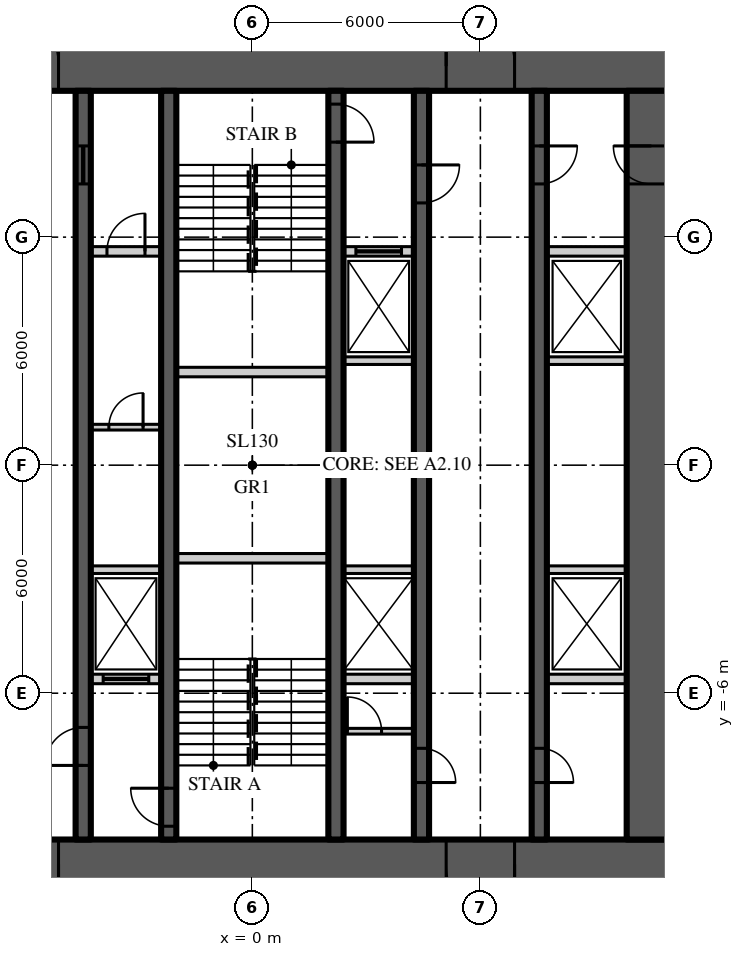
"""IFC4 building model, lengths in metres.
Left out: names, types, materials, properties, quantities, classifications, styles, units other than length and angle.
Written with IfcOpenShell. Run it as: python <this file> out.ifc"""

import sys

from ifc_helpers import new_model, si_unit, direction, frame, frame_2d, origin, place, context, subcontext, project, spatial, rectangle, extrude, element, fill, save


model = new_model("IFC4")
c1 = context("Model", 3, precision=1e-05, world=origin(), true_north=direction((0.0, 1.0)))
c2 = subcontext(c1, "Body", "Model", "MODEL_VIEW")
j1 = project(units=[si_unit("LENGTHUNIT", "METRE"), si_unit("PLANEANGLEUNIT", "RADIAN")], contexts=[c1])
p1 = place(None, origin())
s1 = spatial("IfcSite", under=j1, at=p1, CompositionType="ELEMENT")
p2 = place(p1, origin())
s2 = spatial("IfcBuilding", under=s1, at=p2, CompositionType="ELEMENT")
p3 = place(p2, frame((0.0, 0.0, 43.5)))
s3 = spatial("IfcBuildingStorey", under=s2, at=p3, CompositionType="ELEMENT", Elevation=43.5)
p4 = place(p3, frame((-11.15, 10.5, 0.0), z_axis=(0.0, 0.0, 1.0), x_axis=(1.0, 0.0, 0.0)))
e1 = element("IfcWall", 1, at=p4, inside=s3, PredefinedType="SHEAR", context=c2, shape_type="SweptSolid", body=[
    extrude(rectangle(XDim=22.3, YDim=1.3, at=frame_2d((11.15, 0.0))), origin(), (0.0, 0.0, 1.0), 3.9),
])
p5 = place(p4, frame((4.25, 0.0, 0.0)))
e2 = element("IfcOpeningElement", 2, at=p5, cuts=e1, PredefinedType="OPENING", context=c2, shape_type="SweptSolid", body=[
    extrude(rectangle(XDim=1.8, YDim=2.2, at=frame_2d((0.9, 1.1))), frame((0.0, 0.66, 0.0), z_axis=(0.0, -1.0, 0.0), x_axis=(1.0, 0.0, 0.0)), (0.0, 0.0, 1.0), 1.32),
])
p6 = place(p4, frame((16.25, 0.0, 0.0)))
e3 = element("IfcOpeningElement", 3, at=p6, cuts=e1, PredefinedType="OPENING", context=c2, shape_type="SweptSolid", body=[
    extrude(rectangle(XDim=1.8, YDim=2.2, at=frame_2d((0.9, 1.1))), frame((0.0, 0.66, 0.0), z_axis=(0.0, -1.0, 0.0), x_axis=(1.0, 0.0, 0.0)), (0.0, 0.0, 1.0), 1.32),
])
p7 = place(p3, frame((11.15, -10.5, 0.0), z_axis=(0.0, 0.0, 1.0), x_axis=(-1.0, 0.0, 0.0)))
e4 = element("IfcWall", 4, at=p7, inside=s3, PredefinedType="SHEAR", context=c2, shape_type="SweptSolid", body=[
    extrude(rectangle(XDim=22.3, YDim=1.3, at=frame_2d((11.15, 0.0))), origin(), (0.0, 0.0, 1.0), 3.9),
])
p8 = place(p7, frame((16.25, 0.0, 0.0)))
e5 = element("IfcOpeningElement", 5, at=p8, cuts=e4, PredefinedType="OPENING", context=c2, shape_type="SweptSolid", body=[
    extrude(rectangle(XDim=1.8, YDim=2.2, at=frame_2d((0.9, 1.1))), frame((0.0, 0.66, 0.0), z_axis=(0.0, -1.0, 0.0), x_axis=(1.0, 0.0, 0.0)), (0.0, 0.0, 1.0), 1.32),
])
p9 = place(p7, frame((4.25, 0.0, 0.0)))
e6 = element("IfcOpeningElement", 6, at=p9, cuts=e4, PredefinedType="OPENING", context=c2, shape_type="SweptSolid", body=[
    extrude(rectangle(XDim=1.8, YDim=2.2, at=frame_2d((0.9, 1.1))), frame((0.0, 0.66, 0.0), z_axis=(0.0, -1.0, 0.0), x_axis=(1.0, 0.0, 0.0)), (0.0, 0.0, 1.0), 1.32),
])
p10 = place(p3, frame((10.5, -9.85, 0.0), z_axis=(0.0, 0.0, 1.0), x_axis=(0.0, 1.0, 0.0)))
e7 = element("IfcWall", 7, at=p10, inside=s3, PredefinedType="SHEAR", context=c2, shape_type="SweptSolid", body=[
    extrude(rectangle(XDim=19.7, YDim=1.3, at=frame_2d((9.85, 0.0))), origin(), (0.0, 0.0, 1.0), 3.9),
])
p11 = place(p10, frame((17.25, 0.0, 0.0)))
e8 = element("IfcOpeningElement", 8, at=p11, cuts=e7, PredefinedType="OPENING", context=c2, shape_type="SweptSolid", body=[
    extrude(rectangle(XDim=1.0, YDim=2.2, at=frame_2d((0.5, 1.1))), frame((0.0, 0.66, 0.0), z_axis=(0.0, -1.0, 0.0), x_axis=(1.0, 0.0, 0.0)), (0.0, 0.0, 1.0), 1.32),
])
p12 = place(p3, frame((7.55, 9.85, 0.0), z_axis=(0.0, 0.0, 1.0), x_axis=(0.0, -1.0, 0.0)))
e9 = element("IfcWall", 9, at=p12, inside=s3, PredefinedType="SHEAR", context=c2, shape_type="SweptSolid", body=[
    extrude(rectangle(XDim=19.7, YDim=0.4, at=frame_2d((9.85, 0.0))), origin(), (0.0, 0.0, 1.0), 3.9),
])
p13 = place(p12, frame((1.45, 0.0, 0.0)))
e10 = element("IfcOpeningElement", 10, at=p13, cuts=e9, PredefinedType="OPENING", context=c2, shape_type="SweptSolid", body=[
    extrude(rectangle(XDim=1.0, YDim=2.2, at=frame_2d((0.5, 1.1))), frame((0.0, 0.21, 0.0), z_axis=(0.0, -1.0, 0.0), x_axis=(1.0, 0.0, 0.0)), (0.0, 0.0, 1.0), 0.42),
])
p14 = place(p12, frame((17.3, 0.0, 0.0)))
e11 = element("IfcOpeningElement", 11, at=p14, cuts=e9, PredefinedType="OPENING", context=c2, shape_type="SweptSolid", body=[
    extrude(rectangle(XDim=0.9, YDim=2.1, at=frame_2d((0.45, 1.05))), frame((0.0, 0.21, 0.0), z_axis=(0.0, -1.0, 0.0), x_axis=(1.0, 0.0, 0.0)), (0.0, 0.0, 1.0), 0.42),
])
p15 = place(p3, frame((-4.45, -9.85, 0.0), z_axis=(0.0, 0.0, 1.0), x_axis=(0.0, 1.0, 0.0)))
e12 = element("IfcWall", 12, at=p15, inside=s3, PredefinedType="SHEAR", context=c2, shape_type="SweptSolid", body=[
    extrude(rectangle(XDim=19.7, YDim=0.4, at=frame_2d((9.85, 0.0))), origin(), (0.0, 0.0, 1.0), 3.9),
])
p16 = place(p15, frame((1.95, 0.0, 0.0)))
e13 = element("IfcOpeningElement", 13, at=p16, cuts=e12, PredefinedType="OPENING", context=c2, shape_type="SweptSolid", body=[
    extrude(rectangle(XDim=1.0, YDim=2.2, at=frame_2d((0.5, 1.1))), frame((0.0, 0.21, 0.0), z_axis=(0.0, -1.0, 0.0), x_axis=(1.0, 0.0, 0.0)), (0.0, 0.0, 1.0), 0.42),
])
p17 = place(p15, frame((17.25, 0.0, 0.0)))
e14 = element("IfcOpeningElement", 14, at=p17, cuts=e12, PredefinedType="OPENING", context=c2, shape_type="SweptSolid", body=[
    extrude(rectangle(XDim=1.0, YDim=2.1, at=frame_2d((0.5, 1.05))), frame((0.0, 0.21, 0.0), z_axis=(0.0, -1.0, 0.0), x_axis=(1.0, 0.0, 0.0)), (0.0, 0.0, 1.0), 0.42),
])
p18 = place(p3, frame((4.45, 9.85, 0.0), z_axis=(0.0, 0.0, 1.0), x_axis=(0.0, -1.0, 0.0)))
e15 = element("IfcWall", 15, at=p18, inside=s3, PredefinedType="SHEAR", context=c2, shape_type="SweptSolid", body=[
    extrude(rectangle(XDim=19.7, YDim=0.4, at=frame_2d((9.85, 0.0))), origin(), (0.0, 0.0, 1.0), 3.9),
])
p19 = place(p18, frame((1.95, 0.0, 0.0)))
e16 = element("IfcOpeningElement", 16, at=p19, cuts=e15, PredefinedType="OPENING", context=c2, shape_type="SweptSolid", body=[
    extrude(rectangle(XDim=1.0, YDim=2.2, at=frame_2d((0.5, 1.1))), frame((0.0, 0.21, 0.0), z_axis=(0.0, -1.0, 0.0), x_axis=(1.0, 0.0, 0.0)), (0.0, 0.0, 1.0), 0.42),
])
p20 = place(p18, frame((17.3, 0.0, 0.0)))
e17 = element("IfcOpeningElement", 17, at=p20, cuts=e15, PredefinedType="OPENING", context=c2, shape_type="SweptSolid", body=[
    extrude(rectangle(XDim=0.9, YDim=2.1, at=frame_2d((0.45, 1.05))), frame((0.0, 0.21, 0.0), z_axis=(0.0, -1.0, 0.0), x_axis=(1.0, 0.0, 0.0)), (0.0, 0.0, 1.0), 0.42),
])
p21 = place(p3, frame((-2.2, -9.85, 0.0), z_axis=(0.0, 0.0, 1.0), x_axis=(0.0, 1.0, 0.0)))
e18 = element("IfcWall", 18, at=p21, inside=s3, PredefinedType="SHEAR", context=c2, shape_type="SweptSolid", body=[
    extrude(rectangle(XDim=19.7, YDim=0.4, at=frame_2d((9.85, 0.0))), origin(), (0.0, 0.0, 1.0), 3.9),
])
p22 = place(p21, frame((0.35, 0.0, 0.0)))
e19 = element("IfcOpeningElement", 19, at=p22, cuts=e18, PredefinedType="OPENING", context=c2, shape_type="SweptSolid", body=[
    extrude(rectangle(XDim=1.0, YDim=2.2, at=frame_2d((0.5, 1.1))), frame((0.0, 0.21, 0.0), z_axis=(0.0, -1.0, 0.0), x_axis=(1.0, 0.0, 0.0)), (0.0, 0.0, 1.0), 0.42),
])
p23 = place(p3, frame((2.2, 9.85, 0.0), z_axis=(0.0, 0.0, 1.0), x_axis=(0.0, -1.0, 0.0)))
e20 = element("IfcWall", 20, at=p23, inside=s3, PredefinedType="SHEAR", context=c2, shape_type="SweptSolid", body=[
    extrude(rectangle(XDim=19.7, YDim=0.4, at=frame_2d((9.85, 0.0))), origin(), (0.0, 0.0, 1.0), 3.9),
])
p24 = place(p23, frame((0.35, 0.0, 0.0)))
e21 = element("IfcOpeningElement", 21, at=p24, cuts=e20, PredefinedType="OPENING", context=c2, shape_type="SweptSolid", body=[
    extrude(rectangle(XDim=1.0, YDim=2.2, at=frame_2d((0.5, 1.1))), frame((0.0, 0.21, 0.0), z_axis=(0.0, -1.0, 0.0), x_axis=(1.0, 0.0, 0.0)), (0.0, 0.0, 1.0), 0.42),
])
p25 = place(p3, frame((-4.25, 5.625, 0.0), z_axis=(0.0, 0.0, 1.0), x_axis=(1.0, 0.0, 0.0)))
e22 = element("IfcWall", 22, at=p25, inside=s3, PredefinedType="SOLIDWALL", context=c2, shape_type="SweptSolid", body=[
    extrude(rectangle(XDim=1.85, YDim=0.25, at=frame_2d((0.925, 0.0))), origin(), (0.0, 0.0, 1.0), 3.7),
])
p26 = place(p25, frame((0.425, 0.0, 0.0)))
e23 = element("IfcOpeningElement", 23, at=p26, cuts=e22, PredefinedType="OPENING", context=c2, shape_type="SweptSolid", body=[
    extrude(rectangle(XDim=1.0, YDim=2.2, at=frame_2d((0.5, 1.1))), frame((0.0, 0.135, 0.0), z_axis=(0.0, -1.0, 0.0), x_axis=(1.0, 0.0, 0.0)), (0.0, 0.0, 1.0), 0.27),
])
p27 = place(p3, frame((2.4, 5.625, 0.0), z_axis=(0.0, 0.0, 1.0), x_axis=(1.0, 0.0, 0.0)))
e24 = element("IfcWall", 24, at=p27, inside=s3, PredefinedType="SOLIDWALL", context=c2, shape_type="SweptSolid", body=[
    extrude(rectangle(XDim=1.85, YDim=0.25, at=frame_2d((0.925, 0.0))), origin(), (0.0, 0.0, 1.0), 3.7),
])
p28 = place(p27, frame((0.325, 0.0, 0.0)))
e25 = element("IfcOpeningElement", 25, at=p28, cuts=e24, PredefinedType="OPENING", context=c2, shape_type="SweptSolid", body=[
    extrude(rectangle(XDim=1.2, YDim=2.2, at=frame_2d((0.6, 1.1))), frame((0.0, 0.135, 0.0), z_axis=(0.0, -1.0, 0.0), x_axis=(1.0, 0.0, 0.0)), (0.0, 0.0, 1.0), 0.27),
])
p29 = place(p3, frame((7.75, 5.625, 0.0), z_axis=(0.0, 0.0, 1.0), x_axis=(1.0, 0.0, 0.0)))
e26 = element("IfcWall", 26, at=p29, inside=s3, PredefinedType="SOLIDWALL", context=c2, shape_type="SweptSolid", body=[
    extrude(rectangle(XDim=2.1, YDim=0.25, at=frame_2d((1.05, 0.0))), origin(), (0.0, 0.0, 1.0), 3.7),
])
p30 = place(p3, frame((-4.25, -5.625, 0.0), z_axis=(0.0, 0.0, 1.0), x_axis=(1.0, 0.0, 0.0)))
e27 = element("IfcWall", 27, at=p30, inside=s3, PredefinedType="SOLIDWALL", context=c2, shape_type="SweptSolid", body=[
    extrude(rectangle(XDim=1.85, YDim=0.25, at=frame_2d((0.925, 0.0))), origin(), (0.0, 0.0, 1.0), 3.7),
])
p31 = place(p30, frame((0.325, 0.0, 0.0)))
e28 = element("IfcOpeningElement", 28, at=p31, cuts=e27, PredefinedType="OPENING", context=c2, shape_type="SweptSolid", body=[
    extrude(rectangle(XDim=1.2, YDim=2.2, at=frame_2d((0.6, 1.1))), frame((0.0, 0.135, 0.0), z_axis=(0.0, -1.0, 0.0), x_axis=(1.0, 0.0, 0.0)), (0.0, 0.0, 1.0), 0.27),
])
p32 = place(p3, frame((2.4, -5.625, 0.0), z_axis=(0.0, 0.0, 1.0), x_axis=(1.0, 0.0, 0.0)))
e29 = element("IfcWall", 29, at=p32, inside=s3, PredefinedType="SOLIDWALL", context=c2, shape_type="SweptSolid", body=[
    extrude(rectangle(XDim=1.85, YDim=0.25, at=frame_2d((0.925, 0.0))), origin(), (0.0, 0.0, 1.0), 3.7),
])
p33 = place(p3, frame((7.75, -5.625, 0.0), z_axis=(0.0, 0.0, 1.0), x_axis=(1.0, 0.0, 0.0)))
e30 = element("IfcWall", 30, at=p33, inside=s3, PredefinedType="SOLIDWALL", context=c2, shape_type="SweptSolid", body=[
    extrude(rectangle(XDim=2.1, YDim=0.25, at=frame_2d((1.05, 0.0))), origin(), (0.0, 0.0, 1.0), 3.7),
])
for number, where, z_axis, x_axis in (
    (31, (-2.0, -2.45, 0.0), (0.0, 0.0, 1.0), (1.0, 0.0, 0.0)),
    (32, (-2.0, 2.45, 0.0), (0.0, 0.0, 1.0), (1.0, 0.0, 0.0)),
):
    element("IfcWall", number, at=place(p3, frame(where, z_axis=z_axis, x_axis=x_axis)), inside=s3, PredefinedType="SOLIDWALL", context=c2, shape_type="SweptSolid", body=[
        extrude(rectangle(XDim=4.0, YDim=0.25, at=frame_2d((2.0, 0.0))), origin(), (0.0, 0.0, 1.0), 3.7),
    ])
for number, where, z_axis, x_axis in (
    (33, (-4.25, -2.75, 0.0), (0.0, 0.0, 1.0), (1.0, 0.0, 0.0)),
    (34, (2.4, -2.75, 0.0), (0.0, 0.0, 1.0), (1.0, 0.0, 0.0)),
):
    element("IfcWall", number, at=place(p3, frame(where, z_axis=z_axis, x_axis=x_axis)), inside=s3, PredefinedType="SOLIDWALL", context=c2, shape_type="SweptSolid", body=[
        extrude(rectangle(XDim=1.85, YDim=0.2, at=frame_2d((0.925, 0.0))), origin(), (0.0, 0.0, 1.0), 3.7),
    ])
p34 = place(p3, frame((7.75, -2.75, 0.0), z_axis=(0.0, 0.0, 1.0), x_axis=(1.0, 0.0, 0.0)))
e35 = element("IfcWall", 35, at=p34, inside=s3, PredefinedType="SOLIDWALL", context=c2, shape_type="SweptSolid", body=[
    extrude(rectangle(XDim=2.1, YDim=0.2, at=frame_2d((1.05, 0.0))), origin(), (0.0, 0.0, 1.0), 3.7),
])
p35 = place(p3, frame((2.4, 2.75, 0.0), z_axis=(0.0, 0.0, 1.0), x_axis=(1.0, 0.0, 0.0)))
e36 = element("IfcWall", 36, at=p35, inside=s3, PredefinedType="SOLIDWALL", context=c2, shape_type="SweptSolid", body=[
    extrude(rectangle(XDim=1.85, YDim=0.2, at=frame_2d((0.925, 0.0))), origin(), (0.0, 0.0, 1.0), 3.7),
])
p36 = place(p3, frame((7.75, 2.75, 0.0), z_axis=(0.0, 0.0, 1.0), x_axis=(1.0, 0.0, 0.0)))
e37 = element("IfcWall", 37, at=p36, inside=s3, PredefinedType="SOLIDWALL", context=c2, shape_type="SweptSolid", body=[
    extrude(rectangle(XDim=2.1, YDim=0.2, at=frame_2d((1.05, 0.0))), origin(), (0.0, 0.0, 1.0), 3.7),
])
p37 = place(p3, frame((-4.25, 1.0, 0.0), z_axis=(0.0, 0.0, 1.0), x_axis=(1.0, 0.0, 0.0)))
e38 = element("IfcWall", 38, at=p37, inside=s3, PredefinedType="SOLIDWALL", context=c2, shape_type="SweptSolid", body=[
    extrude(rectangle(XDim=1.85, YDim=0.15, at=frame_2d((0.925, 0.0))), origin(), (0.0, 0.0, 1.0), 3.77),
])
p38 = place(p37, frame((0.475, 0.0, 0.0)))
e39 = element("IfcOpeningElement", 39, at=p38, cuts=e38, PredefinedType="OPENING", context=c2, shape_type="SweptSolid", body=[
    extrude(rectangle(XDim=0.9, YDim=2.1, at=frame_2d((0.45, 1.05))), frame((0.0, 0.085, 0.0), z_axis=(0.0, -1.0, 0.0), x_axis=(1.0, 0.0, 0.0)), (0.0, 0.0, 1.0), 0.17),
])
p39 = place(p3, frame((2.4, -7.0, 0.0), z_axis=(0.0, 0.0, 1.0), x_axis=(1.0, 0.0, 0.0)))
e40 = element("IfcWall", 40, at=p39, inside=s3, PredefinedType="SOLIDWALL", context=c2, shape_type="SweptSolid", body=[
    extrude(rectangle(XDim=1.85, YDim=0.15, at=frame_2d((0.925, 0.0))), origin(), (0.0, 0.0, 1.0), 3.77),
])
p40 = place(p39, frame((0.1, 0.0, 0.0)))
e41 = element("IfcOpeningElement", 41, at=p40, cuts=e40, PredefinedType="OPENING", context=c2, shape_type="SweptSolid", body=[
    extrude(rectangle(XDim=0.9, YDim=2.1, at=frame_2d((0.45, 1.05))), frame((0.0, 0.085, 0.0), z_axis=(0.0, -1.0, 0.0), x_axis=(1.0, 0.0, 0.0)), (0.0, 0.0, 1.0), 0.17),
])
p41 = place(p5, origin())
e42 = element("IfcDoor", 42, at=p41, inside=s3, OperationType="DOUBLE_DOOR_DOUBLE_SWING", PredefinedType="DOOR", context=c2, shape_type="SweptSolid", body=[
    extrude(rectangle(XDim=1.8, YDim=2.2, at=frame_2d((0.9, 1.1))), frame((0.0, 0.025, 0.0), z_axis=(0.0, -1.0, 0.0), x_axis=(1.0, 0.0, 0.0)), (0.0, 0.0, 1.0), 0.05),
])
fill(e2, e42)
p42 = place(p8, origin())
e43 = element("IfcDoor", 43, at=p42, inside=s3, OperationType="DOUBLE_DOOR_DOUBLE_SWING", PredefinedType="DOOR", context=c2, shape_type="SweptSolid", body=[
    extrude(rectangle(XDim=1.8, YDim=2.2, at=frame_2d((0.9, 1.1))), frame((0.0, 0.025, 0.0), z_axis=(0.0, -1.0, 0.0), x_axis=(1.0, 0.0, 0.0)), (0.0, 0.0, 1.0), 0.05),
])
fill(e5, e43)
p43 = place(p6, origin())
e44 = element("IfcDoor", 44, at=p43, inside=s3, OperationType="DOUBLE_DOOR_DOUBLE_SWING", PredefinedType="DOOR", context=c2, shape_type="SweptSolid", body=[
    extrude(rectangle(XDim=1.8, YDim=2.2, at=frame_2d((0.9, 1.1))), frame((0.0, 0.025, 0.0), z_axis=(0.0, -1.0, 0.0), x_axis=(1.0, 0.0, 0.0)), (0.0, 0.0, 1.0), 0.05),
])
fill(e3, e44)
p44 = place(p9, origin())
e45 = element("IfcDoor", 45, at=p44, inside=s3, OperationType="DOUBLE_DOOR_DOUBLE_SWING", PredefinedType="DOOR", context=c2, shape_type="SweptSolid", body=[
    extrude(rectangle(XDim=1.8, YDim=2.2, at=frame_2d((0.9, 1.1))), frame((0.0, 0.025, 0.0), z_axis=(0.0, -1.0, 0.0), x_axis=(1.0, 0.0, 0.0)), (0.0, 0.0, 1.0), 0.05),
])
fill(e6, e45)
p45 = place(p13, origin())
e46 = element("IfcDoor", 46, at=p45, inside=s3, OperationType="SINGLE_SWING_LEFT", PredefinedType="DOOR", context=c2, shape_type="SweptSolid", body=[
    extrude(rectangle(XDim=1.0, YDim=2.2, at=frame_2d((0.5, 1.1))), frame((0.0, 0.025, 0.0), z_axis=(0.0, -1.0, 0.0), x_axis=(1.0, 0.0, 0.0)), (0.0, 0.0, 1.0), 0.05),
])
fill(e10, e46)
p46 = place(p11, origin())
e47 = element("IfcDoor", 47, at=p46, inside=s3, OperationType="SINGLE_SWING_RIGHT", PredefinedType="DOOR", context=c2, shape_type="SweptSolid", body=[
    extrude(rectangle(XDim=1.0, YDim=2.2, at=frame_2d((0.5, 1.1))), frame((0.0, 0.025, 0.0), z_axis=(0.0, -1.0, 0.0), x_axis=(1.0, 0.0, 0.0)), (0.0, 0.0, 1.0), 0.05),
])
fill(e8, e47)
p47 = place(p16, origin())
e48 = element("IfcDoor", 48, at=p47, inside=s3, OperationType="SINGLE_SWING_LEFT", PredefinedType="DOOR", context=c2, shape_type="SweptSolid", body=[
    extrude(rectangle(XDim=1.0, YDim=2.2, at=frame_2d((0.5, 1.1))), frame((0.0, 0.025, 0.0), z_axis=(0.0, -1.0, 0.0), x_axis=(1.0, 0.0, 0.0)), (0.0, 0.0, 1.0), 0.05),
])
fill(e13, e48)
p48 = place(p22, origin())
e49 = element("IfcDoor", 49, at=p48, inside=s3, OperationType="SINGLE_SWING_RIGHT", PredefinedType="DOOR", context=c2, shape_type="SweptSolid", body=[
    extrude(rectangle(XDim=1.0, YDim=2.2, at=frame_2d((0.5, 1.1))), frame((0.0, 0.025, 0.0), z_axis=(0.0, -1.0, 0.0), x_axis=(1.0, 0.0, 0.0)), (0.0, 0.0, 1.0), 0.05),
])
fill(e19, e49)
p49 = place(p19, origin())
e50 = element("IfcDoor", 50, at=p49, inside=s3, OperationType="SINGLE_SWING_LEFT", PredefinedType="DOOR", context=c2, shape_type="SweptSolid", body=[
    extrude(rectangle(XDim=1.0, YDim=2.2, at=frame_2d((0.5, 1.1))), frame((0.0, 0.025, 0.0), z_axis=(0.0, -1.0, 0.0), x_axis=(1.0, 0.0, 0.0)), (0.0, 0.0, 1.0), 0.05),
])
fill(e16, e50)
p50 = place(p24, origin())
e51 = element("IfcDoor", 51, at=p50, inside=s3, OperationType="SINGLE_SWING_RIGHT", PredefinedType="DOOR", context=c2, shape_type="SweptSolid", body=[
    extrude(rectangle(XDim=1.0, YDim=2.2, at=frame_2d((0.5, 1.1))), frame((0.0, 0.025, 0.0), z_axis=(0.0, -1.0, 0.0), x_axis=(1.0, 0.0, 0.0)), (0.0, 0.0, 1.0), 0.05),
])
fill(e21, e51)
p51 = place(p17, origin())
e52 = element("IfcDoor", 52, at=p51, inside=s3, OperationType="SLIDING_TO_LEFT", PredefinedType="DOOR", context=c2, shape_type="SweptSolid", body=[
    extrude(rectangle(XDim=1.0, YDim=2.1, at=frame_2d((0.5, 1.05))), frame((0.0, 0.025, 0.0), z_axis=(0.0, -1.0, 0.0), x_axis=(1.0, 0.0, 0.0)), (0.0, 0.0, 1.0), 0.05),
])
fill(e14, e52)
p52 = place(p14, origin())
e53 = element("IfcDoor", 53, at=p52, inside=s3, OperationType="SINGLE_SWING_RIGHT", PredefinedType="DOOR", context=c2, shape_type="SweptSolid", body=[
    extrude(rectangle(XDim=0.9, YDim=2.1, at=frame_2d((0.45, 1.05))), frame((0.0, 0.025, 0.0), z_axis=(0.0, -1.0, 0.0), x_axis=(1.0, 0.0, 0.0)), (0.0, 0.0, 1.0), 0.05),
])
fill(e11, e53)
p53 = place(p20, origin())
e54 = element("IfcDoor", 54, at=p53, inside=s3, OperationType="SINGLE_SWING_RIGHT", PredefinedType="DOOR", context=c2, shape_type="SweptSolid", body=[
    extrude(rectangle(XDim=0.9, YDim=2.1, at=frame_2d((0.45, 1.05))), frame((0.0, 0.025, 0.0), z_axis=(0.0, -1.0, 0.0), x_axis=(1.0, 0.0, 0.0)), (0.0, 0.0, 1.0), 0.05),
])
fill(e17, e54)
p54 = place(p31, origin())
e55 = element("IfcDoor", 55, at=p54, inside=s3, OperationType="SLIDING_TO_LEFT", PredefinedType="DOOR", context=c2, shape_type="SweptSolid", body=[
    extrude(rectangle(XDim=1.2, YDim=2.2, at=frame_2d((0.6, 1.1))), frame((0.0, 0.025, 0.0), z_axis=(0.0, -1.0, 0.0), x_axis=(1.0, 0.0, 0.0)), (0.0, 0.0, 1.0), 0.05),
])
fill(e28, e55)
p55 = place(p28, origin())
e56 = element("IfcDoor", 56, at=p55, inside=s3, OperationType="SLIDING_TO_LEFT", PredefinedType="DOOR", context=c2, shape_type="SweptSolid", body=[
    extrude(rectangle(XDim=1.2, YDim=2.2, at=frame_2d((0.6, 1.1))), frame((0.0, 0.025, 0.0), z_axis=(0.0, -1.0, 0.0), x_axis=(1.0, 0.0, 0.0)), (0.0, 0.0, 1.0), 0.05),
])
fill(e25, e56)
p56 = place(p38, origin())
e57 = element("IfcDoor", 57, at=p56, inside=s3, OperationType="SINGLE_SWING_RIGHT", PredefinedType="DOOR", context=c2, shape_type="SweptSolid", body=[
    extrude(rectangle(XDim=0.9, YDim=2.1, at=frame_2d((0.45, 1.05))), frame((0.0, 0.025, 0.0), z_axis=(0.0, -1.0, 0.0), x_axis=(1.0, 0.0, 0.0)), (0.0, 0.0, 1.0), 0.05),
])
fill(e39, e57)
p57 = place(p26, origin())
e58 = element("IfcDoor", 58, at=p57, inside=s3, OperationType="SINGLE_SWING_RIGHT", PredefinedType="DOOR", context=c2, shape_type="SweptSolid", body=[
    extrude(rectangle(XDim=1.0, YDim=2.2, at=frame_2d((0.5, 1.1))), frame((0.0, 0.025, 0.0), z_axis=(0.0, -1.0, 0.0), x_axis=(1.0, 0.0, 0.0)), (0.0, 0.0, 1.0), 0.05),
])
fill(e23, e58)
p58 = place(p40, origin())
e59 = element("IfcDoor", 59, at=p58, inside=s3, OperationType="SINGLE_SWING_LEFT", PredefinedType="DOOR", context=c2, shape_type="SweptSolid", body=[
    extrude(rectangle(XDim=0.9, YDim=2.1, at=frame_2d((0.45, 1.05))), frame((0.0, 0.025, 0.0), z_axis=(0.0, -1.0, 0.0), x_axis=(1.0, 0.0, 0.0)), (0.0, 0.0, 1.0), 0.05),
])
fill(e41, e59)
save(model, sys.argv[1])
